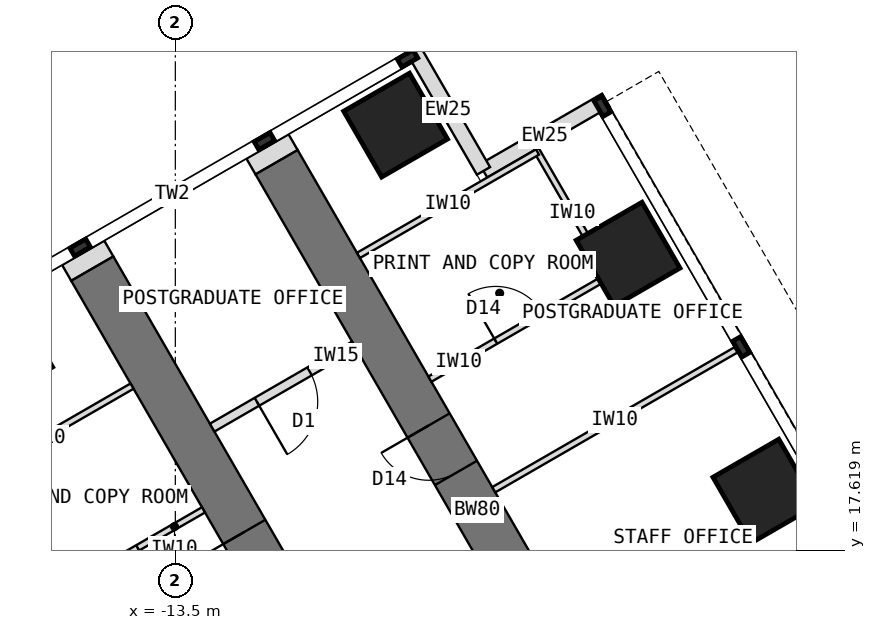
"""IFC4 building model, lengths in metres.
Left out: names, types, materials, properties, quantities, classifications, styles, units other than length and angle.
Written with IfcOpenShell. Run it as: python <this file> out.ifc"""

import sys

from ifc_helpers import new_model, si_unit, direction, frame, frame_2d, origin, origin_2d, place, context, subcontext, project, spatial, rectangle, extrude, element, fill, save


model = new_model("IFC4")
c1 = context("Model", 3, precision=1e-05, world=origin(), true_north=direction((0.0, 1.0)))
c2 = subcontext(c1, "Body", "Model", "MODEL_VIEW")
j1 = project(units=[si_unit("LENGTHUNIT", "METRE"), si_unit("PLANEANGLEUNIT", "RADIAN")], contexts=[c1])
p1 = place(None, origin())
s1 = spatial("IfcSite", under=j1, at=p1, CompositionType="ELEMENT")
p2 = place(p1, origin())
s2 = spatial("IfcBuilding", under=s1, at=p2, CompositionType="ELEMENT")
p3 = place(p2, frame((0.0, 0.0, 161.5)))
s3 = spatial("IfcBuildingStorey", under=s2, at=p3, CompositionType="ELEMENT", Elevation=161.5)
p4 = place(p3, frame((-8.266, 10.816, 0.0), z_axis=(0.0, 0.0, 1.0), x_axis=(-0.499996231654, 0.866027579429, 0.0)))
e1 = element("IfcWall", 1, at=p4, inside=s3, PredefinedType="SHEAR", context=c2, shape_type="SweptSolid", body=[
    extrude(rectangle(XDim=13.2, YDim=0.8, at=frame_2d((6.6, 0.0))), origin(), (0.0, 0.0, 1.0), 4.0),
])
p5 = place(p4, frame((0.55, 0.0, 0.0)))
e2 = element("IfcOpeningElement", 2, at=p5, cuts=e1, PredefinedType="OPENING", context=c2, shape_type="SweptSolid", body=[
    extrude(rectangle(XDim=0.9, YDim=2.1, at=frame_2d((0.45, 1.05))), frame((0.0, 0.41, 0.0), z_axis=(0.0, -1.0, 0.0), x_axis=(1.0, 0.0, 0.0)), (0.0, 0.0, 1.0), 0.82),
])
p6 = place(p4, frame((2.8, 0.0, 0.0)))
e3 = element("IfcOpeningElement", 3, at=p6, cuts=e1, PredefinedType="OPENING", context=c2, shape_type="SweptSolid", body=[
    extrude(rectangle(XDim=0.9, YDim=2.1, at=frame_2d((0.45, 1.05))), frame((0.0, 0.41, 0.0), z_axis=(0.0, -1.0, 0.0), x_axis=(1.0, 0.0, 0.0)), (0.0, 0.0, 1.0), 0.82),
])
p7 = place(p4, frame((7.3, 0.0, 0.0)))
e4 = element("IfcOpeningElement", 4, at=p7, cuts=e1, PredefinedType="OPENING", context=c2, shape_type="SweptSolid", body=[
    extrude(rectangle(XDim=0.9, YDim=2.1, at=frame_2d((0.45, 1.05))), frame((0.0, 0.41, 0.0), z_axis=(0.0, -1.0, 0.0), x_axis=(1.0, 0.0, 0.0)), (0.0, 0.0, 1.0), 0.82),
])
p8 = place(p3, frame((-5.234, 12.566, 0.0), z_axis=(0.0, 0.0, 1.0), x_axis=(-0.500010103361, 0.866019570528, 0.0)))
e5 = element("IfcWall", 5, at=p8, inside=s3, PredefinedType="SHEAR", context=c2, shape_type="SweptSolid", body=[
    extrude(rectangle(XDim=13.2, YDim=0.8, at=frame_2d((6.6, 0.0))), origin(), (0.0, 0.0, 1.0), 4.0),
])
p9 = place(p8, frame((0.55, 0.0, 0.0)))
e6 = element("IfcOpeningElement", 6, at=p9, cuts=e5, PredefinedType="OPENING", context=c2, shape_type="SweptSolid", body=[
    extrude(rectangle(XDim=0.9, YDim=2.1, at=frame_2d((0.45, 1.05))), frame((0.0, 0.41, 0.0), z_axis=(0.0, -1.0, 0.0), x_axis=(1.0, 0.0, 0.0)), (0.0, 0.0, 1.0), 0.82),
])
p10 = place(p8, frame((2.8, 0.0, 0.0)))
e7 = element("IfcOpeningElement", 7, at=p10, cuts=e5, PredefinedType="OPENING", context=c2, shape_type="SweptSolid", body=[
    extrude(rectangle(XDim=0.9, YDim=2.1, at=frame_2d((0.45, 1.05))), frame((0.0, 0.41, 0.0), z_axis=(0.0, -1.0, 0.0), x_axis=(1.0, 0.0, 0.0)), (0.0, 0.0, 1.0), 0.82),
])
p11 = place(p8, frame((7.3, 0.0, 0.0)))
e8 = element("IfcOpeningElement", 8, at=p11, cuts=e5, PredefinedType="OPENING", context=c2, shape_type="SweptSolid", body=[
    extrude(rectangle(XDim=0.9, YDim=2.1, at=frame_2d((0.45, 1.05))), frame((0.0, 0.41, 0.0), z_axis=(0.0, -1.0, 0.0), x_axis=(1.0, 0.0, 0.0)), (0.0, 0.0, 1.0), 0.82),
])
for number, where, z_axis, x_axis in (
    (9, (-3.804, 18.588, 0.0), (0.0, 0.0, 1.0), (0.866, 0.5, 0.0)),
    (10, (-6.054, 22.486, 0.0), (0.0, 0.0, 1.0), (0.866, 0.5, 0.0)),
    (11, (-16.373, 20.858, 0.0), (0.0, 0.0, 1.0), (0.866, 0.5, 0.0)),
    (12, (-9.877, 24.608, 0.0), (0.0, 0.0, 1.0), (0.866, 0.5, 0.0)),
):
    element("IfcColumn", number, at=place(p3, frame(where, z_axis=z_axis, x_axis=x_axis)), inside=s3, PredefinedType="COLUMN", context=c2, shape_type="SweptSolid", body=[
        extrude(rectangle(XDim=1.25, YDim=1.25, at=origin_2d()), origin(), (0.0, 0.0, 1.0), 4.0),
    ])
for number, where, z_axis, x_axis in (
    (13, (-6.419, 25.017, 0.0), (0.0, 0.0, 1.0), (-0.866, -0.5, 0.0)),
    (14, (-8.432, 23.855, 0.0), (0.0, 0.0, 1.0), (-0.5, 0.866, 0.0)),
):
    element("IfcWall", number, at=place(p3, frame(where, z_axis=z_axis, x_axis=x_axis)), inside=s3, PredefinedType="STANDARD", context=c2, shape_type="SweptSolid", body=[
        extrude(rectangle(XDim=2.325, YDim=0.25, at=frame_2d((1.163, 0.0))), origin(), (0.0, 0.0, 1.0), 3.7),
    ])
p12 = place(p3, frame((-14.865, 22.248, 0.0), z_axis=(0.0, 0.0, 1.0), x_axis=(-0.500426713919, 0.865778900179, 0.0)))
e15 = element("IfcWall", 15, at=p12, inside=s3, PredefinedType="PARTITIONING", context=c2, shape_type="SweptSolid", body=[
    extrude(rectangle(XDim=0.3, YDim=0.8, at=frame_2d((0.15, 0.0))), origin(), (0.0, 0.0, 1.0), 3.7),
])
p13 = place(p3, frame((-11.834, 23.998, 0.0), z_axis=(0.0, 0.0, 1.0), x_axis=(-0.499816412211, 0.866131372301, 0.0)))
e16 = element("IfcWall", 16, at=p13, inside=s3, PredefinedType="PARTITIONING", context=c2, shape_type="SweptSolid", body=[
    extrude(rectangle(XDim=0.3, YDim=0.8, at=frame_2d((0.15, 0.0))), origin(), (0.0, 0.0, 1.0), 3.7),
])
p14 = place(p3, frame((-13.037, 18.281, 0.0), z_axis=(0.0, 0.0, 1.0), x_axis=(-0.866007419912, -0.500031147688, 0.0)))
e17 = element("IfcWall", 17, at=p14, inside=s3, PredefinedType="PARTITIONING", context=c2, shape_type="SweptSolid", body=[
    extrude(rectangle(XDim=3.4, YDim=0.1, at=frame_2d((1.7, 0.0))), origin(), (0.0, 0.0, 1.0), 3.7),
])
p15 = place(p14, frame((1.25, 0.0, 0.0)))
e18 = element("IfcOpeningElement", 18, at=p15, cuts=e17, PredefinedType="OPENING", context=c2, shape_type="SweptSolid", body=[
    extrude(rectangle(XDim=0.9, YDim=2.1, at=frame_2d((0.45, 1.05))), frame((0.0, 0.06, 0.0), z_axis=(0.0, -1.0, 0.0), x_axis=(1.0, 0.0, 0.0)), (0.0, 0.0, 1.0), 0.12),
])
p16 = place(p3, frame((-14.212, 20.316, 0.0), z_axis=(0.0, 0.0, 1.0), x_axis=(-0.866007419912, -0.500031147688, 0.0)))
e19 = element("IfcWall", 19, at=p16, inside=s3, PredefinedType="PARTITIONING", context=c2, shape_type="SweptSolid", body=[
    extrude(rectangle(XDim=3.4, YDim=0.1, at=frame_2d((1.7, 0.0))), origin(), (0.0, 0.0, 1.0), 3.7),
])
p17 = place(p3, frame((-8.263, 18.612, 0.0), z_axis=(0.0, 0.0, 1.0), x_axis=(0.866016770315, 0.500014953309, 0.0)))
e20 = element("IfcWall", 20, at=p17, inside=s3, PredefinedType="PARTITIONING", context=c2, shape_type="SweptSolid", body=[
    extrude(rectangle(XDim=4.6, YDim=0.1, at=frame_2d((2.3, 0.0))), origin(), (0.0, 0.0, 1.0), 3.7),
])
p18 = place(p3, frame((-6.369, 22.131, 0.0), z_axis=(0.0, 0.0, 1.0), x_axis=(-0.499957262057, 0.866050077142, 0.0)))
e21 = element("IfcWall", 21, at=p18, inside=s3, PredefinedType="PARTITIONING", context=c2, shape_type="SweptSolid", body=[
    extrude(rectangle(XDim=2.4, YDim=0.1, at=frame_2d((1.2, 0.0))), origin(), (0.0, 0.0, 1.0), 3.7),
])
p19 = place(p3, frame((-9.313, 20.431, 0.0), z_axis=(0.0, 0.0, 1.0), x_axis=(0.866020560687, 0.500008388397, 0.0)))
e22 = element("IfcWall", 22, at=p19, inside=s3, PredefinedType="PARTITIONING", context=c2, shape_type="SweptSolid", body=[
    extrude(rectangle(XDim=3.4, YDim=0.1, at=frame_2d((1.7, 0.0))), origin(), (0.0, 0.0, 1.0), 3.7),
])
p20 = place(p19, frame((1.25, 0.0, 0.0)))
e23 = element("IfcOpeningElement", 23, at=p20, cuts=e22, PredefinedType="OPENING", context=c2, shape_type="SweptSolid", body=[
    extrude(rectangle(XDim=0.9, YDim=2.1, at=frame_2d((0.45, 1.05))), frame((0.0, 0.06, 0.0), z_axis=(0.0, -1.0, 0.0), x_axis=(1.0, 0.0, 0.0)), (0.0, 0.0, 1.0), 0.12),
])
p21 = place(p3, frame((-10.488, 22.466, 0.0), z_axis=(0.0, 0.0, 1.0), x_axis=(0.866038511948, 0.499977295307, 0.0)))
e24 = element("IfcWall", 24, at=p21, inside=s3, PredefinedType="PARTITIONING", context=c2, shape_type="SweptSolid", body=[
    extrude(rectangle(XDim=3.4, YDim=0.1, at=frame_2d((1.7, 0.0))), origin(), (0.0, 0.0, 1.0), 3.7),
])
p22 = place(p3, frame((-10.556, 20.983, 0.0), z_axis=(0.0, 0.0, 1.0), x_axis=(-0.86599734893, -0.500048589285, 0.0)))
e25 = element("IfcWall", 25, at=p22, inside=s3, PredefinedType="PARTITIONING", context=c2, shape_type="SweptSolid", body=[
    extrude(rectangle(XDim=2.7, YDim=0.15, at=frame_2d((1.35, 0.0))), origin(), (0.0, 0.0, 1.0), 3.7),
])
p23 = place(p22, frame((0.85, 0.0, 0.0)))
e26 = element("IfcOpeningElement", 26, at=p23, cuts=e25, PredefinedType="OPENING", context=c2, shape_type="SweptSolid", body=[
    extrude(rectangle(XDim=1.0, YDim=2.1, at=frame_2d((0.5, 1.05))), frame((0.0, 0.085, 0.0), z_axis=(0.0, -1.0, 0.0), x_axis=(1.0, 0.0, 0.0)), (0.0, 0.0, 1.0), 0.17),
])
p24 = place(p15, origin())
e27 = element("IfcDoor", 27, at=p24, inside=s3, OperationType="SINGLE_SWING_LEFT", PredefinedType="DOOR", context=c2, shape_type="SweptSolid", body=[
    extrude(rectangle(XDim=0.9, YDim=2.1, at=frame_2d((0.45, 1.05))), frame((0.0, 0.025, 0.0), z_axis=(0.0, -1.0, 0.0), x_axis=(1.0, 0.0, 0.0)), (0.0, 0.0, 1.0), 0.05),
])
fill(e18, e27)
p25 = place(p20, origin())
e28 = element("IfcDoor", 28, at=p25, inside=s3, OperationType="SINGLE_SWING_LEFT", PredefinedType="DOOR", context=c2, shape_type="SweptSolid", body=[
    extrude(rectangle(XDim=0.9, YDim=2.1, at=frame_2d((0.45, 1.05))), frame((0.0, 0.025, 0.0), z_axis=(0.0, -1.0, 0.0), x_axis=(1.0, 0.0, 0.0)), (0.0, 0.0, 1.0), 0.05),
])
fill(e23, e28)
p26 = place(p23, origin())
e29 = element("IfcDoor", 29, at=p26, inside=s3, OperationType="SINGLE_SWING_RIGHT", PredefinedType="DOOR", context=c2, shape_type="SweptSolid", body=[
    extrude(rectangle(XDim=1.0, YDim=2.1, at=frame_2d((0.5, 1.05))), frame((0.0, 0.025, 0.0), z_axis=(0.0, -1.0, 0.0), x_axis=(1.0, 0.0, 0.0)), (0.0, 0.0, 1.0), 0.05),
])
fill(e26, e29)
p27 = place(p7, origin())
e30 = element("IfcDoor", 30, at=p27, inside=s3, OperationType="SINGLE_SWING_RIGHT", PredefinedType="DOOR", context=c2, shape_type="SweptSolid", body=[
    extrude(rectangle(XDim=0.82, YDim=2.06, at=frame_2d((0.45, 1.03))), frame((0.0, 0.025, 0.0), z_axis=(0.0, -1.0, 0.0), x_axis=(1.0, 0.0, 0.0)), (0.0, 0.0, 1.0), 0.05),
    extrude(rectangle(XDim=0.04, YDim=2.1, at=frame_2d((0.02, 1.05))), frame((0.0, 0.4, 0.0), z_axis=(0.0, -1.0, 0.0), x_axis=(1.0, 0.0, 0.0)), (0.0, 0.0, 1.0), 0.8),
    extrude(rectangle(XDim=0.04, YDim=2.1, at=frame_2d((0.88, 1.05))), frame((0.0, 0.4, 0.0), z_axis=(0.0, -1.0, 0.0), x_axis=(1.0, 0.0, 0.0)), (0.0, 0.0, 1.0), 0.8),
    extrude(rectangle(XDim=0.82, YDim=0.04, at=frame_2d((0.45, 2.08))), frame((0.0, 0.4, 0.0), z_axis=(0.0, -1.0, 0.0), x_axis=(1.0, 0.0, 0.0)), (0.0, 0.0, 1.0), 0.8),
])
fill(e4, e30)
p28 = place(p11, origin())
e31 = element("IfcDoor", 31, at=p28, inside=s3, OperationType="SINGLE_SWING_RIGHT", PredefinedType="DOOR", context=c2, shape_type="SweptSolid", body=[
    extrude(rectangle(XDim=0.82, YDim=2.06, at=frame_2d((0.45, 1.03))), frame((0.0, 0.025, 0.0), z_axis=(0.0, -1.0, 0.0), x_axis=(1.0, 0.0, 0.0)), (0.0, 0.0, 1.0), 0.05),
    extrude(rectangle(XDim=0.04, YDim=2.1, at=frame_2d((0.02, 1.05))), frame((0.0, 0.4, 0.0), z_axis=(0.0, -1.0, 0.0), x_axis=(1.0, 0.0, 0.0)), (0.0, 0.0, 1.0), 0.8),
    extrude(rectangle(XDim=0.04, YDim=2.1, at=frame_2d((0.88, 1.05))), frame((0.0, 0.4, 0.0), z_axis=(0.0, -1.0, 0.0), x_axis=(1.0, 0.0, 0.0)), (0.0, 0.0, 1.0), 0.8),
    extrude(rectangle(XDim=0.82, YDim=0.04, at=frame_2d((0.45, 2.08))), frame((0.0, 0.4, 0.0), z_axis=(0.0, -1.0, 0.0), x_axis=(1.0, 0.0, 0.0)), (0.0, 0.0, 1.0), 0.8),
])
fill(e8, e31)
save(model, sys.argv[1])
